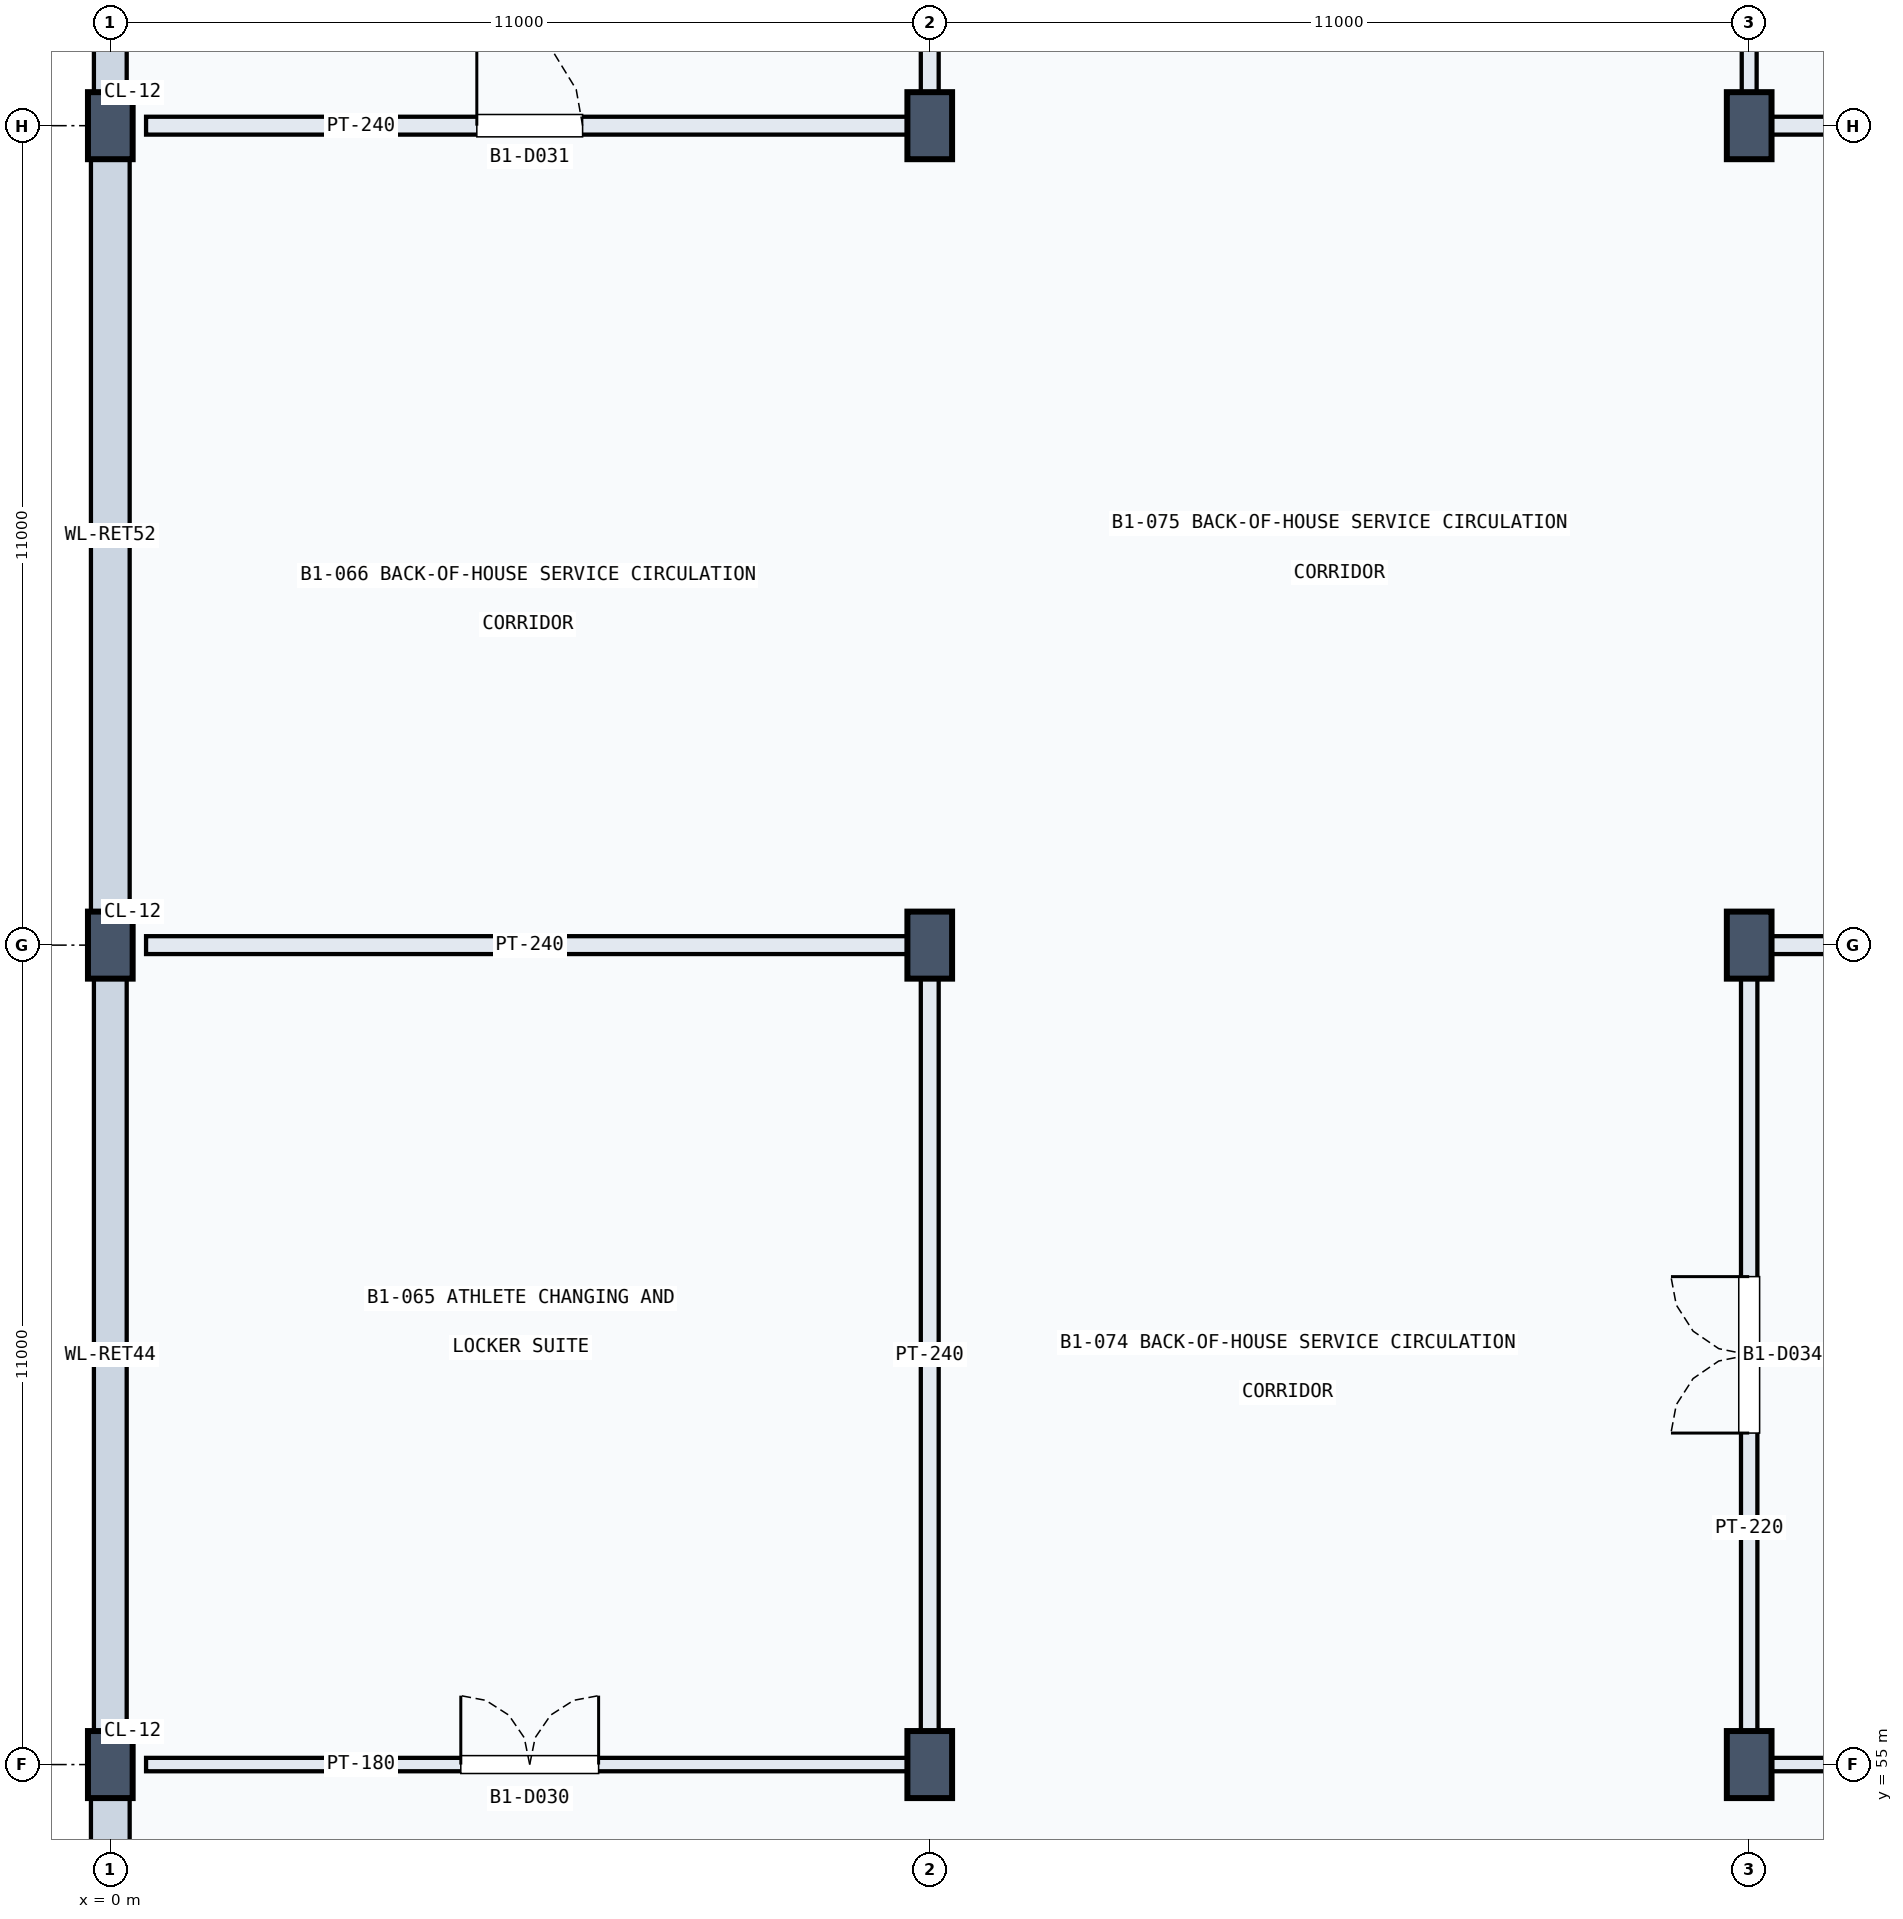
"""IFC4 building model, lengths in metres.
Left out: names, types, materials, properties, quantities, classifications, styles, units other than length and angle.
Written with IfcOpenShell. Run it as: python <this file> out.ifc"""

import sys

from ifc_helpers import new_model, si_unit, direction, frame, frame_2d, origin, origin_2d, place, context, subcontext, project, spatial, rectangle, extrude, element, fill, save


model = new_model("IFC4")
c1 = context("Model", 3, precision=1e-05, world=origin(), true_north=direction((0.0, 1.0)))
c2 = subcontext(c1, "Body", "Model", "MODEL_VIEW")
j1 = project(units=[si_unit("LENGTHUNIT", "METRE"), si_unit("PLANEANGLEUNIT", "RADIAN")], contexts=[c1])
p1 = place(None, origin())
s1 = spatial("IfcSite", under=j1, at=p1, CompositionType="ELEMENT")
p2 = place(p1, origin())
s2 = spatial("IfcBuilding", under=s1, at=p2, CompositionType="ELEMENT")
p3 = place(p2, frame((0.0, 0.0, -5.4)))
s3 = spatial("IfcBuildingStorey", under=s2, at=p3, CompositionType="ELEMENT", Elevation=-5.4)
for number, where, z_axis, x_axis in (
    (1, (0.0, 55.0, 0.0), (0.0, 0.0, 1.0), (1.0, 0.0, 0.0)),
    (2, (0.0, 66.0, 0.0), (0.0, 0.0, 1.0), (1.0, 0.0, 0.0)),
    (3, (0.0, 77.0, 0.0), (0.0, 0.0, 1.0), (1.0, 0.0, 0.0)),
    (4, (11.0, 55.0, 0.0), (0.0, 0.0, 1.0), (1.0, 0.0, 0.0)),
    (5, (11.0, 66.0, 0.0), (0.0, 0.0, 1.0), (1.0, 0.0, 0.0)),
    (6, (11.0, 77.0, 0.0), (0.0, 0.0, 1.0), (1.0, 0.0, 0.0)),
    (7, (22.0, 55.0, 0.0), (0.0, 0.0, 1.0), (1.0, 0.0, 0.0)),
    (8, (22.0, 66.0, 0.0), (0.0, 0.0, 1.0), (1.0, 0.0, 0.0)),
    (9, (22.0, 77.0, 0.0), (0.0, 0.0, 1.0), (1.0, 0.0, 0.0)),
):
    element("IfcColumn", number, at=place(p3, frame(where, z_axis=z_axis, x_axis=x_axis)), inside=s3, PredefinedType="COLUMN", context=c2, shape_type="SweptSolid", body=[
        extrude(rectangle(XDim=0.6, YDim=0.9, at=origin_2d()), origin(), (0.0, 0.0, 1.0), 5.4),
    ])
p4 = place(p3, frame((0.0, 44.22, 0.0), z_axis=(0.0, 0.0, 1.0), x_axis=(0.0, 1.0, 0.0)))
e10 = element("IfcWall", 10, at=p4, inside=s3, PredefinedType="SOLIDWALL", context=c2, shape_type="SweptSolid", body=[
    extrude(rectangle(XDim=10.56, YDim=0.52, at=frame_2d((5.28, 0.0))), origin(), (0.0, 0.0, 1.0), 4.418),
])
p5 = place(p3, frame((0.0, 55.22, 0.0), z_axis=(0.0, 0.0, 1.0), x_axis=(0.0, 1.0, 0.0)))
e11 = element("IfcWall", 11, at=p5, inside=s3, PredefinedType="SOLIDWALL", context=c2, shape_type="SweptSolid", body=[
    extrude(rectangle(XDim=10.56, YDim=0.44, at=frame_2d((5.28, 0.0))), origin(), (0.0, 0.0, 1.0), 4.13),
])
p6 = place(p3, frame((0.0, 66.22, 0.0), z_axis=(0.0, 0.0, 1.0), x_axis=(0.0, 1.0, 0.0)))
e12 = element("IfcWall", 12, at=p6, inside=s3, PredefinedType="SOLIDWALL", context=c2, shape_type="SweptSolid", body=[
    extrude(rectangle(XDim=10.56, YDim=0.52, at=frame_2d((5.28, 0.0))), origin(), (0.0, 0.0, 1.0), 4.13),
])
p7 = place(p3, frame((0.0, 77.22, 0.0), z_axis=(0.0, 0.0, 1.0), x_axis=(0.0, 1.0, 0.0)))
e13 = element("IfcWall", 13, at=p7, inside=s3, PredefinedType="SOLIDWALL", context=c2, shape_type="SweptSolid", body=[
    extrude(rectangle(XDim=10.56, YDim=0.44, at=frame_2d((5.28, 0.0))), origin(), (0.0, 0.0, 1.0), 4.23),
])
p8 = place(p3, frame((0.48, 55.0, 0.0), z_axis=(0.0, 0.0, 1.0), x_axis=(1.0, 0.0, 0.0)))
e14 = element("IfcWall", 14, at=p8, inside=s3, PredefinedType="PARTITIONING", context=c2, shape_type="SweptSolid", body=[
    extrude(rectangle(XDim=10.3, YDim=0.18, at=frame_2d((5.15, 0.0))), origin(), (0.0, 0.0, 1.0), 4.41),
])
p9 = place(p8, frame((4.225, 0.0, 0.0)))
e15 = element("IfcOpeningElement", 15, at=p9, cuts=e14, PredefinedType="OPENING", context=c2, shape_type="SweptSolid", body=[
    extrude(rectangle(XDim=1.85, YDim=2.35, at=frame_2d((0.925, 1.175))), frame((0.0, 0.1, 0.0), z_axis=(0.0, -1.0, 0.0), x_axis=(1.0, 0.0, 0.0)), (0.0, 0.0, 1.0), 0.2),
])
p10 = place(p3, frame((0.48, 66.0, 0.0), z_axis=(0.0, 0.0, 1.0), x_axis=(1.0, 0.0, 0.0)))
e16 = element("IfcWall", 16, at=p10, inside=s3, PredefinedType="PARTITIONING", context=c2, shape_type="SweptSolid", body=[
    extrude(rectangle(XDim=10.3, YDim=0.24, at=frame_2d((5.15, 0.0))), origin(), (0.0, 0.0, 1.0), 4.08),
])
p11 = place(p3, frame((11.0, 55.22, 0.0), z_axis=(0.0, 0.0, 1.0), x_axis=(0.0, 1.0, 0.0)))
e17 = element("IfcWall", 17, at=p11, inside=s3, PredefinedType="PARTITIONING", context=c2, shape_type="SweptSolid", body=[
    extrude(rectangle(XDim=10.56, YDim=0.24, at=frame_2d((5.28, 0.0))), origin(), (0.0, 0.0, 1.0), 4.08),
])
p12 = place(p3, frame((0.48, 77.0, 0.0), z_axis=(0.0, 0.0, 1.0), x_axis=(1.0, 0.0, 0.0)))
e18 = element("IfcWall", 18, at=p12, inside=s3, PredefinedType="PARTITIONING", context=c2, shape_type="SweptSolid", body=[
    extrude(rectangle(XDim=10.3, YDim=0.24, at=frame_2d((5.15, 0.0))), origin(), (0.0, 0.0, 1.0), 4.23),
])
p13 = place(p12, frame((4.44, 0.0, 0.0)))
e19 = element("IfcOpeningElement", 19, at=p13, cuts=e18, PredefinedType="OPENING", context=c2, shape_type="SweptSolid", body=[
    extrude(rectangle(XDim=1.42, YDim=2.25, at=frame_2d((0.71, 1.125))), frame((0.0, 0.13, 0.0), z_axis=(0.0, -1.0, 0.0), x_axis=(1.0, 0.0, 0.0)), (0.0, 0.0, 1.0), 0.26),
])
p14 = place(p3, frame((11.0, 77.22, 0.0), z_axis=(0.0, 0.0, 1.0), x_axis=(0.0, 1.0, 0.0)))
e20 = element("IfcWall", 20, at=p14, inside=s3, PredefinedType="PARTITIONING", context=c2, shape_type="SweptSolid", body=[
    extrude(rectangle(XDim=10.56, YDim=0.24, at=frame_2d((5.28, 0.0))), origin(), (0.0, 0.0, 1.0), 4.23),
])
p15 = place(p3, frame((22.0, 55.22, 0.0), z_axis=(0.0, 0.0, 1.0), x_axis=(0.0, 1.0, 0.0)))
e21 = element("IfcWall", 21, at=p15, inside=s3, PredefinedType="PARTITIONING", context=c2, shape_type="SweptSolid", body=[
    extrude(rectangle(XDim=10.56, YDim=0.22, at=frame_2d((5.28, 0.0))), origin(), (0.0, 0.0, 1.0), 4.08),
])
p16 = place(p15, frame((4.23, 0.0, 0.0)))
e22 = element("IfcOpeningElement", 22, at=p16, cuts=e21, PredefinedType="OPENING", context=c2, shape_type="SweptSolid", body=[
    extrude(rectangle(XDim=2.1, YDim=2.2, at=frame_2d((1.05, 1.1))), frame((0.0, 0.12, 0.0), z_axis=(0.0, -1.0, 0.0), x_axis=(1.0, 0.0, 0.0)), (0.0, 0.0, 1.0), 0.24),
])
p17 = place(p3, frame((22.0, 77.22, 0.0), z_axis=(0.0, 0.0, 1.0), x_axis=(0.0, 1.0, 0.0)))
e23 = element("IfcWall", 23, at=p17, inside=s3, PredefinedType="PARTITIONING", context=c2, shape_type="SweptSolid", body=[
    extrude(rectangle(XDim=10.56, YDim=0.2, at=frame_2d((5.28, 0.0))), origin(), (0.0, 0.0, 1.0), 4.08),
])
p18 = place(p17, frame((4.72, 0.0, 0.0)))
e24 = element("IfcOpeningElement", 24, at=p18, cuts=e23, PredefinedType="OPENING", context=c2, shape_type="SweptSolid", body=[
    extrude(rectangle(XDim=1.12, YDim=2.25, at=frame_2d((0.56, 1.125))), frame((0.0, 0.11, 0.0), z_axis=(0.0, -1.0, 0.0), x_axis=(1.0, 0.0, 0.0)), (0.0, 0.0, 1.0), 0.22),
])
p19 = place(p3, frame((22.22, 55.0, 0.0), z_axis=(0.0, 0.0, 1.0), x_axis=(1.0, 0.0, 0.0)))
e25 = element("IfcWall", 25, at=p19, inside=s3, PredefinedType="PARTITIONING", context=c2, shape_type="SweptSolid", body=[
    extrude(rectangle(XDim=11.56, YDim=0.18, at=frame_2d((5.78, 0.0))), origin(), (0.0, 0.0, 1.0), 4.08),
])
p20 = place(p3, frame((22.22, 66.0, 0.0), z_axis=(0.0, 0.0, 1.0), x_axis=(1.0, 0.0, 0.0)))
e26 = element("IfcWall", 26, at=p20, inside=s3, PredefinedType="PARTITIONING", context=c2, shape_type="SweptSolid", body=[
    extrude(rectangle(XDim=11.56, YDim=0.24, at=frame_2d((5.78, 0.0))), origin(), (0.0, 0.0, 1.0), 4.08),
])
p21 = place(p3, frame((22.22, 77.0, 0.0), z_axis=(0.0, 0.0, 1.0), x_axis=(1.0, 0.0, 0.0)))
e27 = element("IfcWall", 27, at=p21, inside=s3, PredefinedType="PARTITIONING", context=c2, shape_type="SweptSolid", body=[
    extrude(rectangle(XDim=11.57, YDim=0.24, at=frame_2d((5.785, 0.0))), origin(), (0.0, 0.0, 1.0), 4.08),
])
p22 = place(p9, origin())
e28 = element("IfcDoor", 28, at=p22, inside=s3, OperationType="DOUBLE_DOOR_SINGLE_SWING", PredefinedType="DOOR", context=c2, shape_type="SweptSolid", body=[
    extrude(rectangle(XDim=1.85, YDim=2.35, at=frame_2d((0.925, 1.175))), frame((0.0, 0.025, 0.0), z_axis=(0.0, -1.0, 0.0), x_axis=(1.0, 0.0, 0.0)), (0.0, 0.0, 1.0), 0.05),
])
fill(e15, e28)
p23 = place(p13, origin())
e29 = element("IfcDoor", 29, at=p23, inside=s3, OperationType="SINGLE_SWING_LEFT", PredefinedType="DOOR", context=c2, shape_type="SweptSolid", body=[
    extrude(rectangle(XDim=1.42, YDim=2.25, at=frame_2d((0.71, 1.125))), frame((0.0, 0.025, 0.0), z_axis=(0.0, -1.0, 0.0), x_axis=(1.0, 0.0, 0.0)), (0.0, 0.0, 1.0), 0.05),
])
fill(e19, e29)
p24 = place(p16, origin())
e30 = element("IfcDoor", 30, at=p24, inside=s3, OperationType="DOUBLE_DOOR_SINGLE_SWING", PredefinedType="DOOR", context=c2, shape_type="SweptSolid", body=[
    extrude(rectangle(XDim=2.1, YDim=2.2, at=frame_2d((1.05, 1.1))), frame((0.0, 0.025, 0.0), z_axis=(0.0, -1.0, 0.0), x_axis=(1.0, 0.0, 0.0)), (0.0, 0.0, 1.0), 0.05),
])
fill(e22, e30)
save(model, sys.argv[1])
